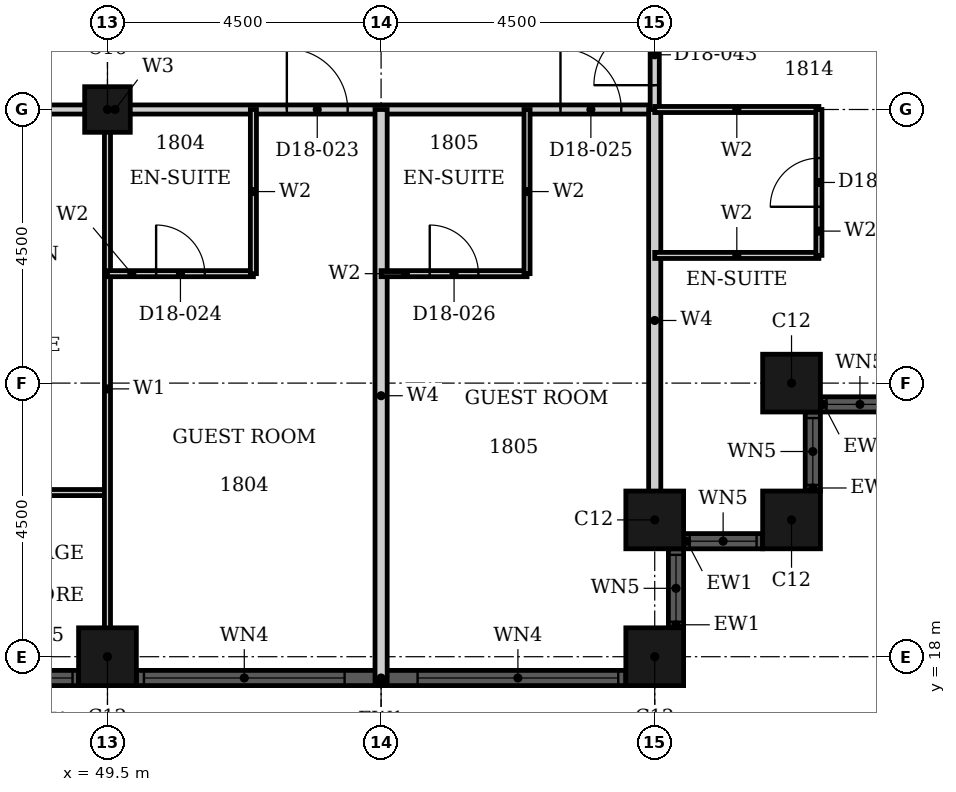
"""IFC4 building model, lengths in metres.
Left out: names, types, materials, properties, quantities, classifications, styles, units other than length and angle.
Written with IfcOpenShell. Run it as: python <this file> out.ifc"""

import sys

from ifc_helpers import new_model, si_unit, direction, frame, frame_2d, origin, origin_2d, place, context, subcontext, project, spatial, rectangle, hollow_rectangle, extrude, element, fill, save


model = new_model("IFC4")
c1 = context("Model", 3, precision=1e-05, world=origin(), true_north=direction((0.0, 1.0)))
c2 = subcontext(c1, "Body", "Model", "MODEL_VIEW")
j1 = project(units=[si_unit("LENGTHUNIT", "METRE"), si_unit("PLANEANGLEUNIT", "RADIAN")], contexts=[c1])
p1 = place(None, origin())
s1 = spatial("IfcSite", under=j1, at=p1, CompositionType="ELEMENT")
p2 = place(p1, origin())
s2 = spatial("IfcBuilding", under=s1, at=p2, CompositionType="ELEMENT")
p3 = place(p2, frame((0.0, 0.0, 78.0)))
s3 = spatial("IfcBuildingStorey", under=s2, at=p3, CompositionType="ELEMENT", Elevation=78.0)
for number, where, z_axis, x_axis in (
    (1, (49.5, 18.0, 0.0), (0.0, 0.0, 1.0), (1.0, 0.0, 0.0)),
    (2, (58.5, 18.0, 0.0), (0.0, 0.0, 1.0), (1.0, 0.0, 0.0)),
    (3, (58.5, 20.25, 0.0), (0.0, 0.0, 1.0), (1.0, 0.0, 0.0)),
    (4, (60.75, 20.25, 0.0), (0.0, 0.0, 1.0), (1.0, 0.0, 0.0)),
    (5, (60.75, 22.5, 0.0), (0.0, 0.0, 1.0), (1.0, 0.0, 0.0)),
):
    element("IfcColumn", number, at=place(p3, frame(where, z_axis=z_axis, x_axis=x_axis)), inside=s3, PredefinedType="COLUMN", context=c2, shape_type="SweptSolid", body=[
        extrude(hollow_rectangle(XDim=0.95, YDim=0.95, WallThickness=0.03, at=origin_2d()), origin(), (0.0, 0.0, 1.0), 3.6),
    ])
p4 = place(p3, frame((49.5, 27.0, 0.0), z_axis=(0.0, 0.0, 1.0), x_axis=(1.0, 0.0, 0.0)))
e6 = element("IfcColumn", 6, at=p4, inside=s3, PredefinedType="COLUMN", context=c2, shape_type="SweptSolid", body=[
    extrude(hollow_rectangle(XDim=0.75, YDim=0.75, WallThickness=0.024, at=origin_2d()), origin(), (0.0, 0.0, 1.0), 3.6),
])
p5 = place(p3, frame((47.725, 17.65, 0.0), z_axis=(0.0, 0.0, 1.0), x_axis=(1.0, 0.0, 0.0)))
e7 = element("IfcWall", 7, at=p5, inside=s3, PredefinedType="SOLIDWALL", context=c2, shape_type="SweptSolid", body=[
    extrude(rectangle(XDim=1.3, YDim=0.25, at=frame_2d((0.65, 0.0))), origin(), (0.0, 0.0, 1.0), 3.6),
])
p6 = place(p5, frame((0.1, 0.0, 0.9)))
e8 = element("IfcOpeningElement", 8, at=p6, cuts=e7, PredefinedType="OPENING", context=c2, shape_type="SweptSolid", body=[
    extrude(rectangle(XDim=1.1, YDim=2.08, at=frame_2d((0.55, 1.04))), frame((0.0, 0.135, 0.0), z_axis=(0.0, -1.0, 0.0), x_axis=(1.0, 0.0, 0.0)), (0.0, 0.0, 1.0), 0.27),
])
p7 = place(p3, frame((49.975, 17.65, 0.0), z_axis=(0.0, 0.0, 1.0), x_axis=(1.0, 0.0, 0.0)))
e9 = element("IfcWall", 9, at=p7, inside=s3, PredefinedType="SOLIDWALL", context=c2, shape_type="SweptSolid", body=[
    extrude(rectangle(XDim=8.05, YDim=0.25, at=frame_2d((4.025, 0.0))), origin(), (0.0, 0.0, 1.0), 3.6),
])
p8 = place(p7, frame((0.125, 0.0, 0.9)))
e10 = element("IfcOpeningElement", 10, at=p8, cuts=e9, PredefinedType="OPENING", context=c2, shape_type="SweptSolid", body=[
    extrude(rectangle(XDim=3.3, YDim=2.08, at=frame_2d((1.65, 1.04))), frame((0.0, 0.135, 0.0), z_axis=(0.0, -1.0, 0.0), x_axis=(1.0, 0.0, 0.0)), (0.0, 0.0, 1.0), 0.27),
])
p9 = place(p7, frame((4.625, 0.0, 0.9)))
e11 = element("IfcOpeningElement", 11, at=p9, cuts=e9, PredefinedType="OPENING", context=c2, shape_type="SweptSolid", body=[
    extrude(rectangle(XDim=3.3, YDim=2.08, at=frame_2d((1.65, 1.04))), frame((0.0, 0.135, 0.0), z_axis=(0.0, -1.0, 0.0), x_axis=(1.0, 0.0, 0.0)), (0.0, 0.0, 1.0), 0.27),
])
p10 = place(p3, frame((58.85, 18.475, 0.0), z_axis=(0.0, 0.0, 1.0), x_axis=(0.0, 1.0, 0.0)))
e12 = element("IfcWall", 12, at=p10, inside=s3, PredefinedType="SOLIDWALL", context=c2, shape_type="SweptSolid", body=[
    extrude(rectangle(XDim=1.3, YDim=0.25, at=frame_2d((0.65, 0.0))), origin(), (0.0, 0.0, 1.0), 3.6),
])
p11 = place(p10, frame((0.1, 0.0, 0.9)))
e13 = element("IfcOpeningElement", 13, at=p11, cuts=e12, PredefinedType="OPENING", context=c2, shape_type="SweptSolid", body=[
    extrude(rectangle(XDim=1.1, YDim=2.08, at=frame_2d((0.55, 1.04))), frame((0.0, 0.135, 0.0), z_axis=(0.0, -1.0, 0.0), x_axis=(1.0, 0.0, 0.0)), (0.0, 0.0, 1.0), 0.27),
])
p12 = place(p3, frame((58.975, 19.9, 0.0), z_axis=(0.0, 0.0, 1.0), x_axis=(1.0, 0.0, 0.0)))
e14 = element("IfcWall", 14, at=p12, inside=s3, PredefinedType="SOLIDWALL", context=c2, shape_type="SweptSolid", body=[
    extrude(rectangle(XDim=1.3, YDim=0.25, at=frame_2d((0.65, 0.0))), origin(), (0.0, 0.0, 1.0), 3.6),
])
p13 = place(p12, frame((0.1, 0.0, 0.9)))
e15 = element("IfcOpeningElement", 15, at=p13, cuts=e14, PredefinedType="OPENING", context=c2, shape_type="SweptSolid", body=[
    extrude(rectangle(XDim=1.1, YDim=2.08, at=frame_2d((0.55, 1.04))), frame((0.0, 0.135, 0.0), z_axis=(0.0, -1.0, 0.0), x_axis=(1.0, 0.0, 0.0)), (0.0, 0.0, 1.0), 0.27),
])
p14 = place(p3, frame((61.1, 20.725, 0.0), z_axis=(0.0, 0.0, 1.0), x_axis=(0.0, 1.0, 0.0)))
e16 = element("IfcWall", 16, at=p14, inside=s3, PredefinedType="SOLIDWALL", context=c2, shape_type="SweptSolid", body=[
    extrude(rectangle(XDim=1.3, YDim=0.25, at=frame_2d((0.65, 0.0))), origin(), (0.0, 0.0, 1.0), 3.6),
])
p15 = place(p14, frame((0.1, 0.0, 0.9)))
e17 = element("IfcOpeningElement", 17, at=p15, cuts=e16, PredefinedType="OPENING", context=c2, shape_type="SweptSolid", body=[
    extrude(rectangle(XDim=1.1, YDim=2.08, at=frame_2d((0.55, 1.04))), frame((0.0, 0.135, 0.0), z_axis=(0.0, -1.0, 0.0), x_axis=(1.0, 0.0, 0.0)), (0.0, 0.0, 1.0), 0.27),
])
p16 = place(p3, frame((61.225, 22.15, 0.0), z_axis=(0.0, 0.0, 1.0), x_axis=(1.0, 0.0, 0.0)))
e18 = element("IfcWall", 18, at=p16, inside=s3, PredefinedType="SOLIDWALL", context=c2, shape_type="SweptSolid", body=[
    extrude(rectangle(XDim=1.3, YDim=0.25, at=frame_2d((0.65, 0.0))), origin(), (0.0, 0.0, 1.0), 3.6),
])
p17 = place(p16, frame((0.1, 0.0, 0.9)))
e19 = element("IfcOpeningElement", 19, at=p17, cuts=e18, PredefinedType="OPENING", context=c2, shape_type="SweptSolid", body=[
    extrude(rectangle(XDim=1.1, YDim=2.08, at=frame_2d((0.55, 1.04))), frame((0.0, 0.135, 0.0), z_axis=(0.0, -1.0, 0.0), x_axis=(1.0, 0.0, 0.0)), (0.0, 0.0, 1.0), 0.27),
])
p18 = place(p3, frame((46.8, 27.0, 0.0), z_axis=(0.0, 0.0, 1.0), x_axis=(1.0, 0.0, 0.0)))
e20 = element("IfcWall", 20, at=p18, inside=s3, PredefinedType="PARTITIONING", context=c2, shape_type="SweptSolid", body=[
    extrude(rectangle(XDim=11.7, YDim=0.15, at=frame_2d((5.85, 0.0))), origin(), (0.0, 0.0, 1.0), 2.58),
])
p19 = place(p18, frame((5.65, 0.0, 0.0)))
e21 = element("IfcOpeningElement", 21, at=p19, cuts=e20, PredefinedType="OPENING", context=c2, shape_type="SweptSolid", body=[
    extrude(rectangle(XDim=1.0, YDim=2.1, at=frame_2d((0.5, 1.05))), frame((0.0, 0.085, 0.0), z_axis=(0.0, -1.0, 0.0), x_axis=(1.0, 0.0, 0.0)), (0.0, 0.0, 1.0), 0.17),
])
p20 = place(p18, frame((10.15, 0.0, 0.0)))
e22 = element("IfcOpeningElement", 22, at=p20, cuts=e20, PredefinedType="OPENING", context=c2, shape_type="SweptSolid", body=[
    extrude(rectangle(XDim=1.0, YDim=2.1, at=frame_2d((0.5, 1.05))), frame((0.0, 0.085, 0.0), z_axis=(0.0, -1.0, 0.0), x_axis=(1.0, 0.0, 0.0)), (0.0, 0.0, 1.0), 0.17),
])
p21 = place(p3, frame((58.5, 27.0, 0.0), z_axis=(0.0, 0.0, 1.0), x_axis=(0.0, 1.0, 0.0)))
e23 = element("IfcWall", 23, at=p21, inside=s3, PredefinedType="PARTITIONING", context=c2, shape_type="SweptSolid", body=[
    extrude(rectangle(XDim=1.8, YDim=0.15, at=frame_2d((0.9, 0.0))), origin(), (0.0, 0.0, 1.0), 3.3),
])
p22 = place(p21, frame((0.4, 0.0, 0.0)))
e24 = element("IfcOpeningElement", 24, at=p22, cuts=e23, PredefinedType="OPENING", context=c2, shape_type="SweptSolid", body=[
    extrude(rectangle(XDim=1.0, YDim=2.1, at=frame_2d((0.5, 1.05))), frame((0.0, 0.085, 0.0), z_axis=(0.0, -1.0, 0.0), x_axis=(1.0, 0.0, 0.0)), (0.0, 0.0, 1.0), 0.17),
])
p23 = place(p3, frame((46.8, 20.7, 0.0), z_axis=(0.0, 0.0, 1.0), x_axis=(1.0, 0.0, 0.0)))
e25 = element("IfcWall", 25, at=p23, inside=s3, PredefinedType="PARTITIONING", context=c2, shape_type="SweptSolid", body=[
    extrude(rectangle(XDim=2.7, YDim=0.1, at=frame_2d((1.35, 0.0))), origin(), (0.0, 0.0, 1.0), 3.3),
])
p24 = place(p3, frame((49.5, 17.81, 0.0), z_axis=(0.0, 0.0, 1.0), x_axis=(0.0, 1.0, 0.0)))
e26 = element("IfcWall", 26, at=p24, inside=s3, PredefinedType="PARTITIONING", context=c2, shape_type="SweptSolid", body=[
    extrude(rectangle(XDim=9.19, YDim=0.1, at=frame_2d((4.595, 0.0))), origin(), (0.0, 0.0, 1.0), 2.38),
])
p25 = place(p3, frame((54.0, 17.585, 0.0), z_axis=(0.0, 0.0, 1.0), x_axis=(0.0, 1.0, 0.0)))
e27 = element("IfcWall", 27, at=p25, inside=s3, PredefinedType="PARTITIONING", context=c2, shape_type="SweptSolid", body=[
    extrude(rectangle(XDim=9.415, YDim=0.2, at=frame_2d((4.708, 0.0))), origin(), (0.0, 0.0, 1.0), 3.3),
])
p26 = place(p3, frame((58.5, 20.06, 0.0), z_axis=(0.0, 0.0, 1.0), x_axis=(0.0, 1.0, 0.0)))
e28 = element("IfcWall", 28, at=p26, inside=s3, PredefinedType="PARTITIONING", context=c2, shape_type="SweptSolid", body=[
    extrude(rectangle(XDim=6.94, YDim=0.2, at=frame_2d((3.47, 0.0))), origin(), (0.0, 0.0, 1.0), 3.3),
])
p27 = place(p3, frame((49.5, 24.3, 0.0), z_axis=(0.0, 0.0, 1.0), x_axis=(1.0, 0.0, 0.0)))
e29 = element("IfcWall", 29, at=p27, inside=s3, PredefinedType="PARTITIONING", context=c2, shape_type="SweptSolid", body=[
    extrude(rectangle(XDim=2.4, YDim=0.1, at=frame_2d((1.2, 0.0))), origin(), (0.0, 0.0, 1.0), 3.3),
])
p28 = place(p27, frame((0.8, 0.0, 0.0)))
e30 = element("IfcOpeningElement", 30, at=p28, cuts=e29, PredefinedType="OPENING", context=c2, shape_type="SweptSolid", body=[
    extrude(rectangle(XDim=0.8, YDim=2.1, at=frame_2d((0.4, 1.05))), frame((0.0, 0.06, 0.0), z_axis=(0.0, -1.0, 0.0), x_axis=(1.0, 0.0, 0.0)), (0.0, 0.0, 1.0), 0.12),
])
p29 = place(p3, frame((54.0, 24.3, 0.0), z_axis=(0.0, 0.0, 1.0), x_axis=(1.0, 0.0, 0.0)))
e31 = element("IfcWall", 31, at=p29, inside=s3, PredefinedType="PARTITIONING", context=c2, shape_type="SweptSolid", body=[
    extrude(rectangle(XDim=2.4, YDim=0.1, at=frame_2d((1.2, 0.0))), origin(), (0.0, 0.0, 1.0), 3.3),
])
p30 = place(p29, frame((0.8, 0.0, 0.0)))
e32 = element("IfcOpeningElement", 32, at=p30, cuts=e31, PredefinedType="OPENING", context=c2, shape_type="SweptSolid", body=[
    extrude(rectangle(XDim=0.8, YDim=2.1, at=frame_2d((0.4, 1.05))), frame((0.0, 0.06, 0.0), z_axis=(0.0, -1.0, 0.0), x_axis=(1.0, 0.0, 0.0)), (0.0, 0.0, 1.0), 0.12),
])
p31 = place(p3, frame((58.5, 24.6, 0.0), z_axis=(0.0, 0.0, 1.0), x_axis=(1.0, 0.0, 0.0)))
e33 = element("IfcWall", 33, at=p31, inside=s3, PredefinedType="PARTITIONING", context=c2, shape_type="SweptSolid", body=[
    extrude(rectangle(XDim=2.7, YDim=0.1, at=frame_2d((1.35, 0.0))), origin(), (0.0, 0.0, 1.0), 3.3),
])
p32 = place(p3, frame((58.5, 27.0, 0.0), z_axis=(0.0, 0.0, 1.0), x_axis=(1.0, 0.0, 0.0)))
e34 = element("IfcWall", 34, at=p32, inside=s3, PredefinedType="PARTITIONING", context=c2, shape_type="SweptSolid", body=[
    extrude(rectangle(XDim=2.7, YDim=0.1, at=frame_2d((1.35, 0.0))), origin(), (0.0, 0.0, 1.0), 2.58),
])
for number, where, z_axis, x_axis in (
    (35, (51.9, 24.3, 0.0), (0.0, 0.0, 1.0), (0.0, 1.0, 0.0)),
    (36, (56.4, 24.3, 0.0), (0.0, 0.0, 1.0), (0.0, 1.0, 0.0)),
):
    element("IfcWall", number, at=place(p3, frame(where, z_axis=z_axis, x_axis=x_axis)), inside=s3, PredefinedType="PARTITIONING", context=c2, shape_type="SweptSolid", body=[
        extrude(rectangle(XDim=2.7, YDim=0.1, at=frame_2d((1.35, 0.0))), origin(), (0.0, 0.0, 1.0), 3.3),
    ])
p33 = place(p3, frame((61.2, 24.6, 0.0), z_axis=(0.0, 0.0, 1.0), x_axis=(0.0, 1.0, 0.0)))
e37 = element("IfcWall", 37, at=p33, inside=s3, PredefinedType="PARTITIONING", context=c2, shape_type="SweptSolid", body=[
    extrude(rectangle(XDim=2.4, YDim=0.1, at=frame_2d((1.2, 0.0))), origin(), (0.0, 0.0, 1.0), 3.3),
])
p34 = place(p33, frame((0.8, 0.0, 0.0)))
e38 = element("IfcOpeningElement", 38, at=p34, cuts=e37, PredefinedType="OPENING", context=c2, shape_type="SweptSolid", body=[
    extrude(rectangle(XDim=0.8, YDim=2.1, at=frame_2d((0.4, 1.05))), frame((0.0, 0.06, 0.0), z_axis=(0.0, -1.0, 0.0), x_axis=(1.0, 0.0, 0.0)), (0.0, 0.0, 1.0), 0.12),
])
p35 = place(p6, origin())
e39 = element("IfcWindow", 39, at=p35, inside=s3, PartitioningType="SINGLE_PANEL", PredefinedType="WINDOW", context=c2, shape_type="SweptSolid", body=[
    extrude(rectangle(XDim=1.1, YDim=2.08, at=frame_2d((0.55, 1.04))), frame((0.0, 0.03, 0.0), z_axis=(0.0, -1.0, 0.0), x_axis=(1.0, 0.0, 0.0)), (0.0, 0.0, 1.0), 0.06),
])
fill(e8, e39)
p36 = place(p8, origin())
e40 = element("IfcWindow", 40, at=p36, inside=s3, PartitioningType="SINGLE_PANEL", PredefinedType="WINDOW", context=c2, shape_type="SweptSolid", body=[
    extrude(rectangle(XDim=3.3, YDim=2.08, at=frame_2d((1.65, 1.04))), frame((0.0, 0.03, 0.0), z_axis=(0.0, -1.0, 0.0), x_axis=(1.0, 0.0, 0.0)), (0.0, 0.0, 1.0), 0.06),
])
fill(e10, e40)
p37 = place(p9, origin())
e41 = element("IfcWindow", 41, at=p37, inside=s3, PartitioningType="SINGLE_PANEL", PredefinedType="WINDOW", context=c2, shape_type="SweptSolid", body=[
    extrude(rectangle(XDim=3.3, YDim=2.08, at=frame_2d((1.65, 1.04))), frame((0.0, 0.03, 0.0), z_axis=(0.0, -1.0, 0.0), x_axis=(1.0, 0.0, 0.0)), (0.0, 0.0, 1.0), 0.06),
])
fill(e11, e41)
p38 = place(p11, origin())
e42 = element("IfcWindow", 42, at=p38, inside=s3, PartitioningType="SINGLE_PANEL", PredefinedType="WINDOW", context=c2, shape_type="SweptSolid", body=[
    extrude(rectangle(XDim=1.1, YDim=2.08, at=frame_2d((0.55, 1.04))), frame((0.0, 0.03, 0.0), z_axis=(0.0, -1.0, 0.0), x_axis=(1.0, 0.0, 0.0)), (0.0, 0.0, 1.0), 0.06),
])
fill(e13, e42)
p39 = place(p13, origin())
e43 = element("IfcWindow", 43, at=p39, inside=s3, PartitioningType="SINGLE_PANEL", PredefinedType="WINDOW", context=c2, shape_type="SweptSolid", body=[
    extrude(rectangle(XDim=1.1, YDim=2.08, at=frame_2d((0.55, 1.04))), frame((0.0, 0.03, 0.0), z_axis=(0.0, -1.0, 0.0), x_axis=(1.0, 0.0, 0.0)), (0.0, 0.0, 1.0), 0.06),
])
fill(e15, e43)
p40 = place(p15, origin())
e44 = element("IfcWindow", 44, at=p40, inside=s3, PartitioningType="SINGLE_PANEL", PredefinedType="WINDOW", context=c2, shape_type="SweptSolid", body=[
    extrude(rectangle(XDim=1.1, YDim=2.08, at=frame_2d((0.55, 1.04))), frame((0.0, 0.03, 0.0), z_axis=(0.0, -1.0, 0.0), x_axis=(1.0, 0.0, 0.0)), (0.0, 0.0, 1.0), 0.06),
])
fill(e17, e44)
p41 = place(p17, origin())
e45 = element("IfcWindow", 45, at=p41, inside=s3, PartitioningType="SINGLE_PANEL", PredefinedType="WINDOW", context=c2, shape_type="SweptSolid", body=[
    extrude(rectangle(XDim=1.1, YDim=2.08, at=frame_2d((0.55, 1.04))), frame((0.0, 0.03, 0.0), z_axis=(0.0, -1.0, 0.0), x_axis=(1.0, 0.0, 0.0)), (0.0, 0.0, 1.0), 0.06),
])
fill(e19, e45)
p42 = place(p19, origin())
e46 = element("IfcDoor", 46, at=p42, inside=s3, OperationType="SINGLE_SWING_RIGHT", PredefinedType="DOOR", context=c2, shape_type="SweptSolid", body=[
    extrude(rectangle(XDim=1.0, YDim=2.1, at=frame_2d((0.5, 1.05))), frame((0.0, 0.025, 0.0), z_axis=(0.0, -1.0, 0.0), x_axis=(1.0, 0.0, 0.0)), (0.0, 0.0, 1.0), 0.05),
])
fill(e21, e46)
p43 = place(p28, origin())
e47 = element("IfcDoor", 47, at=p43, inside=s3, OperationType="SINGLE_SWING_RIGHT", PredefinedType="DOOR", context=c2, shape_type="SweptSolid", body=[
    extrude(rectangle(XDim=0.8, YDim=2.1, at=frame_2d((0.4, 1.05))), frame((0.0, 0.025, 0.0), z_axis=(0.0, -1.0, 0.0), x_axis=(1.0, 0.0, 0.0)), (0.0, 0.0, 1.0), 0.05),
])
fill(e30, e47)
p44 = place(p20, origin())
e48 = element("IfcDoor", 48, at=p44, inside=s3, OperationType="SINGLE_SWING_RIGHT", PredefinedType="DOOR", context=c2, shape_type="SweptSolid", body=[
    extrude(rectangle(XDim=1.0, YDim=2.1, at=frame_2d((0.5, 1.05))), frame((0.0, 0.025, 0.0), z_axis=(0.0, -1.0, 0.0), x_axis=(1.0, 0.0, 0.0)), (0.0, 0.0, 1.0), 0.05),
])
fill(e22, e48)
p45 = place(p30, origin())
e49 = element("IfcDoor", 49, at=p45, inside=s3, OperationType="SINGLE_SWING_RIGHT", PredefinedType="DOOR", context=c2, shape_type="SweptSolid", body=[
    extrude(rectangle(XDim=0.8, YDim=2.1, at=frame_2d((0.4, 1.05))), frame((0.0, 0.025, 0.0), z_axis=(0.0, -1.0, 0.0), x_axis=(1.0, 0.0, 0.0)), (0.0, 0.0, 1.0), 0.05),
])
fill(e32, e49)
p46 = place(p22, origin())
e50 = element("IfcDoor", 50, at=p46, inside=s3, OperationType="SINGLE_SWING_LEFT", PredefinedType="DOOR", context=c2, shape_type="SweptSolid", body=[
    extrude(rectangle(XDim=1.0, YDim=2.1, at=frame_2d((0.5, 1.05))), frame((0.0, 0.025, 0.0), z_axis=(0.0, -1.0, 0.0), x_axis=(1.0, 0.0, 0.0)), (0.0, 0.0, 1.0), 0.05),
])
fill(e24, e50)
p47 = place(p34, origin())
e51 = element("IfcDoor", 51, at=p47, inside=s3, OperationType="SINGLE_SWING_LEFT", PredefinedType="DOOR", context=c2, shape_type="SweptSolid", body=[
    extrude(rectangle(XDim=0.8, YDim=2.1, at=frame_2d((0.4, 1.05))), frame((0.0, 0.025, 0.0), z_axis=(0.0, -1.0, 0.0), x_axis=(1.0, 0.0, 0.0)), (0.0, 0.0, 1.0), 0.05),
])
fill(e38, e51)
save(model, sys.argv[1])
